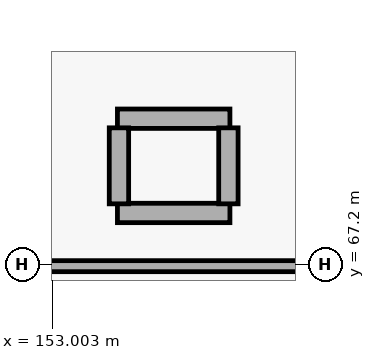
"""IFC4 building model, lengths in metres.
Left out: names, types, materials, properties, quantities, classifications, styles, units other than length and angle.
Written with IfcOpenShell. Run it as: python <this file> out.ifc"""

import sys

from ifc_helpers import new_model, si_unit, direction, frame, frame_2d, origin, place, context, subcontext, project, spatial, rectangle, extrude, element, save


model = new_model("IFC4")
c1 = context("Model", 3, precision=1e-05, world=origin(), true_north=direction((0.0, 1.0)))
c2 = subcontext(c1, "Body", "Model", "MODEL_VIEW")
j1 = project(units=[si_unit("LENGTHUNIT", "METRE"), si_unit("PLANEANGLEUNIT", "RADIAN")], contexts=[c1])
p1 = place(None, origin())
s1 = spatial("IfcSite", under=j1, at=p1, CompositionType="ELEMENT")
p2 = place(p1, origin())
s2 = spatial("IfcBuilding", under=s1, at=p2, CompositionType="ELEMENT")
p3 = place(p2, frame((0.0, 0.0, 10.5)))
s3 = spatial("IfcBuildingStorey", under=s2, at=p3, CompositionType="ELEMENT", Elevation=10.5)
for number, where, z_axis, x_axis in (
    (1, (153.86, 69.12, 0.0), (0.0, 0.0, 1.0), (1.0, 0.0, 0.0)),
    (2, (153.86, 67.88, 0.0), (0.0, 0.0, 1.0), (1.0, 0.0, 0.0)),
):
    element("IfcWall", number, at=place(p3, frame(where, z_axis=z_axis, x_axis=x_axis)), inside=s3, PredefinedType="PARTITIONING", context=c2, shape_type="SweptSolid", body=[
        extrude(rectangle(XDim=1.48, YDim=0.255, at=frame_2d((0.74, 0.0))), origin(), (0.0, 0.0, 1.0), 4.43),
    ])
p4 = place(p3, frame((153.88, 68.0, 0.0), z_axis=(0.0, 0.0, 1.0), x_axis=(0.0, 1.0, 0.0)))
e3 = element("IfcWall", 3, at=p4, inside=s3, PredefinedType="PARTITIONING", context=c2, shape_type="SweptSolid", body=[
    extrude(rectangle(XDim=1.0, YDim=0.255, at=frame_2d((0.5, 0.0))), origin(), (0.0, 0.0, 1.0), 4.72),
])
p5 = place(p3, frame((155.32, 68.0, 0.0), z_axis=(0.0, 0.0, 1.0), x_axis=(0.0, 1.0, 0.0)))
e4 = element("IfcWall", 4, at=p5, inside=s3, PredefinedType="PARTITIONING", context=c2, shape_type="SweptSolid", body=[
    extrude(rectangle(XDim=1.0, YDim=0.255, at=frame_2d((0.5, 0.0))), origin(), (0.0, 0.0, 1.0), 4.43),
])
p6 = place(p3, frame((142.43, 67.18, 0.0), z_axis=(0.0, 0.0, 1.0), x_axis=(1.0, 0.0, 0.0)))
e5 = element("IfcWall", 5, at=p6, inside=s3, PredefinedType="PARTITIONING", context=c2, shape_type="SweptSolid", body=[
    extrude(rectangle(XDim=23.14, YDim=0.145, at=frame_2d((11.57, 0.0))), origin(), (0.0, 0.0, 1.0), 3.9),
])
p7 = place(p6, frame((2.65, 0.0, 0.0)))
e6 = element("IfcOpeningElement", 6, at=p7, cuts=e5, PredefinedType="OPENING", context=c2, shape_type="SweptSolid", body=[
    extrude(rectangle(XDim=1.42, YDim=2.4, at=frame_2d((0.71, 1.2))), frame((0.0, 0.083, 0.0), z_axis=(0.0, -1.0, 0.0), x_axis=(1.0, 0.0, 0.0)), (0.0, 0.0, 1.0), 0.165),
])
save(model, sys.argv[1])
